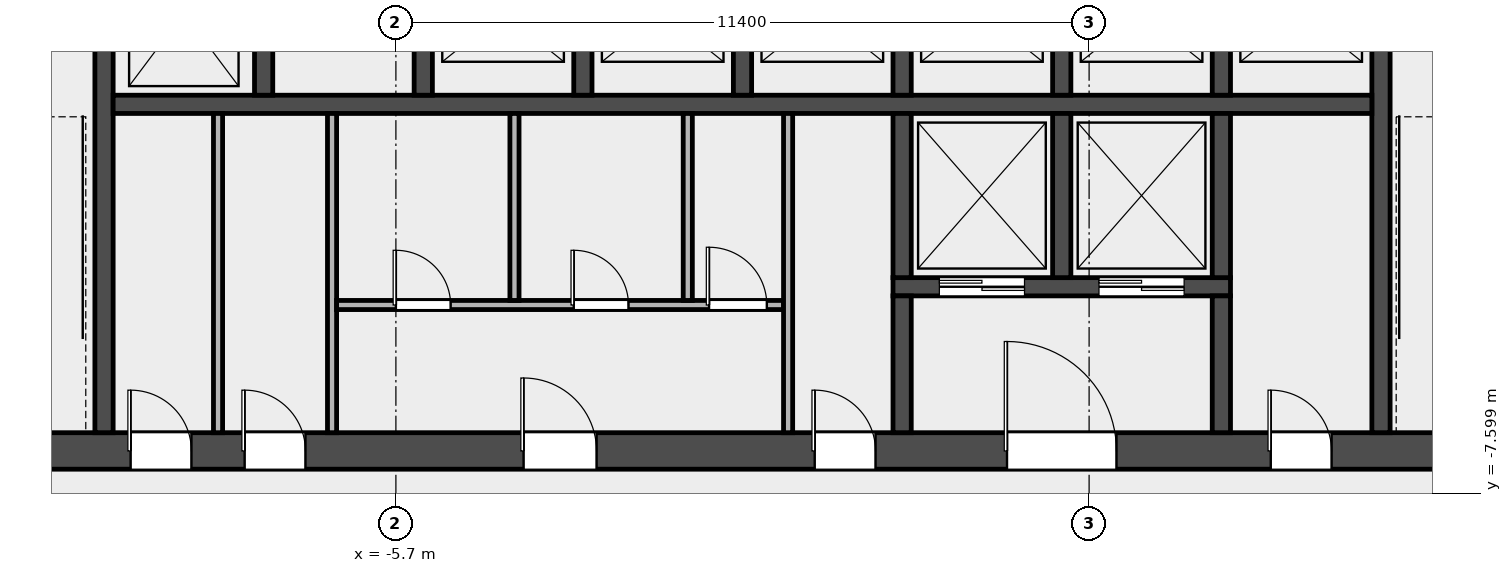
"""IFC4 building model, lengths in metres.
Left out: names, types, materials, properties, quantities, classifications, styles, units other than length and angle.
Written with IfcOpenShell. Run it as: python <this file> out.ifc"""

import sys

from ifc_helpers import new_model, si_unit, direction, frame, frame_2d, origin, place, context, subcontext, project, spatial, rectangle, extrude, element, fill, save


model = new_model("IFC4")
c1 = context("Model", 3, precision=1e-05, world=origin(), true_north=direction((0.0, 1.0)))
c2 = subcontext(c1, "Body", "Model", "MODEL_VIEW")
j1 = project(units=[si_unit("LENGTHUNIT", "METRE"), si_unit("PLANEANGLEUNIT", "RADIAN")], contexts=[c1])
p1 = place(None, origin())
s1 = spatial("IfcSite", under=j1, at=p1, CompositionType="ELEMENT")
p2 = place(p1, origin())
s2 = spatial("IfcBuilding", under=s1, at=p2, CompositionType="ELEMENT")
p3 = place(p2, frame((0.0, 0.0, 40.6)))
s3 = spatial("IfcBuildingStorey", under=s2, at=p3, CompositionType="ELEMENT", Elevation=40.6)
p4 = place(p3, frame((-14.4, -6.9, 0.0), z_axis=(0.0, 0.0, 1.0), x_axis=(1.0, 0.0, 0.0)))
e1 = element("IfcWall", 1, at=p4, inside=s3, PredefinedType="SHEAR", context=c2, shape_type="SweptSolid", body=[
    extrude(rectangle(XDim=28.8, YDim=0.6, at=frame_2d((14.4, 0.0))), origin(), (0.0, 0.0, 1.0), 4.5),
])
p5 = place(p4, frame((4.337, 0.0, 0.0)))
e2 = element("IfcOpeningElement", 2, at=p5, cuts=e1, PredefinedType="OPENING", context=c2, shape_type="SweptSolid", body=[
    extrude(rectangle(XDim=1.0, YDim=2.1, at=frame_2d((0.5, 1.05))), frame((0.0, 0.312, 0.0), z_axis=(0.0, -1.0, 0.0), x_axis=(1.0, 0.0, 0.0)), (0.0, 0.0, 1.0), 0.624),
])
p6 = place(p4, frame((6.212, 0.0, 0.0)))
e3 = element("IfcOpeningElement", 3, at=p6, cuts=e1, PredefinedType="OPENING", context=c2, shape_type="SweptSolid", body=[
    extrude(rectangle(XDim=1.0, YDim=2.1, at=frame_2d((0.5, 1.05))), frame((0.0, 0.312, 0.0), z_axis=(0.0, -1.0, 0.0), x_axis=(1.0, 0.0, 0.0)), (0.0, 0.0, 1.0), 0.624),
])
p7 = place(p4, frame((10.8, 0.0, 0.0)))
e4 = element("IfcOpeningElement", 4, at=p7, cuts=e1, PredefinedType="OPENING", context=c2, shape_type="SweptSolid", body=[
    extrude(rectangle(XDim=1.2, YDim=2.1, at=frame_2d((0.6, 1.05))), frame((0.0, 0.312, 0.0), z_axis=(0.0, -1.0, 0.0), x_axis=(1.0, 0.0, 0.0)), (0.0, 0.0, 1.0), 0.624),
])
p8 = place(p4, frame((15.587, 0.0, 0.0)))
e5 = element("IfcOpeningElement", 5, at=p8, cuts=e1, PredefinedType="OPENING", context=c2, shape_type="SweptSolid", body=[
    extrude(rectangle(XDim=1.0, YDim=2.1, at=frame_2d((0.5, 1.05))), frame((0.0, 0.312, 0.0), z_axis=(0.0, -1.0, 0.0), x_axis=(1.0, 0.0, 0.0)), (0.0, 0.0, 1.0), 0.624),
])
p9 = place(p4, frame((18.75, 0.0, 0.0)))
e6 = element("IfcOpeningElement", 6, at=p9, cuts=e1, PredefinedType="OPENING", context=c2, shape_type="SweptSolid", body=[
    extrude(rectangle(XDim=1.8, YDim=2.1, at=frame_2d((0.9, 1.05))), frame((0.0, 0.312, 0.0), z_axis=(0.0, -1.0, 0.0), x_axis=(1.0, 0.0, 0.0)), (0.0, 0.0, 1.0), 0.624),
])
p10 = place(p4, frame((23.087, 0.0, 0.0)))
e7 = element("IfcOpeningElement", 7, at=p10, cuts=e1, PredefinedType="OPENING", context=c2, shape_type="SweptSolid", body=[
    extrude(rectangle(XDim=1.0, YDim=2.1, at=frame_2d((0.5, 1.05))), frame((0.0, 0.312, 0.0), z_axis=(0.0, -1.0, 0.0), x_axis=(1.0, 0.0, 0.0)), (0.0, 0.0, 1.0), 0.624),
])
for number, where, z_axis, x_axis in (
    (8, (-10.5, -6.6, 0.0), (0.0, 0.0, 1.0), (0.0, 1.0, 0.0)),
    (9, (10.5, -6.6, 0.0), (0.0, 0.0, 1.0), (0.0, 1.0, 0.0)),
):
    element("IfcWall", number, at=place(p3, frame(where, z_axis=z_axis, x_axis=x_axis)), inside=s3, PredefinedType="SHEAR", context=c2, shape_type="SweptSolid", body=[
        extrude(rectangle(XDim=8.55, YDim=0.3, at=frame_2d((4.275, 0.0))), origin(), (0.0, 0.0, 1.0), 4.5),
    ])
p11 = place(p3, frame((-10.35, -1.2, 0.0), z_axis=(0.0, 0.0, 1.0), x_axis=(1.0, 0.0, 0.0)))
e10 = element("IfcWall", 10, at=p11, inside=s3, PredefinedType="SOLIDWALL", context=c2, shape_type="SweptSolid", body=[
    extrude(rectangle(XDim=20.7, YDim=0.3, at=frame_2d((10.35, 0.0))), origin(), (0.0, 0.0, 1.0), 4.5),
])
for number, where, z_axis, x_axis in (
    (11, (-7.875, -1.05, 0.0), (0.0, 0.0, 1.0), (0.0, 1.0, 0.0)),
    (12, (-5.25, -1.05, 0.0), (0.0, 0.0, 1.0), (0.0, 1.0, 0.0)),
    (13, (-2.625, -1.05, 0.0), (0.0, 0.0, 1.0), (0.0, 1.0, 0.0)),
    (14, (0.0, -1.05, 0.0), (0.0, 0.0, 1.0), (0.0, 1.0, 0.0)),
    (15, (2.625, -1.05, 0.0), (0.0, 0.0, 1.0), (0.0, 1.0, 0.0)),
    (16, (5.25, -1.05, 0.0), (0.0, 0.0, 1.0), (0.0, 1.0, 0.0)),
    (17, (7.875, -1.05, 0.0), (0.0, 0.0, 1.0), (0.0, 1.0, 0.0)),
):
    element("IfcWall", number, at=place(p3, frame(where, z_axis=z_axis, x_axis=x_axis)), inside=s3, PredefinedType="SOLIDWALL", context=c2, shape_type="SweptSolid", body=[
        extrude(rectangle(XDim=2.7, YDim=0.3, at=frame_2d((1.35, 0.0))), origin(), (0.0, 0.0, 1.0), 4.5),
    ])
p12 = place(p3, frame((2.475, -4.2, 0.0), z_axis=(0.0, 0.0, 1.0), x_axis=(1.0, 0.0, 0.0)))
e18 = element("IfcWall", 18, at=p12, inside=s3, PredefinedType="SOLIDWALL", context=c2, shape_type="SweptSolid", body=[
    extrude(rectangle(XDim=5.55, YDim=0.3, at=frame_2d((2.775, 0.0))), origin(), (0.0, 0.0, 1.0), 4.5),
])
p13 = place(p12, frame((0.762, 0.0, 0.0)))
e19 = element("IfcOpeningElement", 19, at=p13, cuts=e18, PredefinedType="OPENING", context=c2, shape_type="SweptSolid", body=[
    extrude(rectangle(XDim=1.4, YDim=2.1, at=frame_2d((0.7, 1.05))), frame((0.0, 0.162, 0.0), z_axis=(0.0, -1.0, 0.0), x_axis=(1.0, 0.0, 0.0)), (0.0, 0.0, 1.0), 0.324),
])
p14 = place(p12, frame((3.387, 0.0, 0.0)))
e20 = element("IfcOpeningElement", 20, at=p14, cuts=e18, PredefinedType="OPENING", context=c2, shape_type="SweptSolid", body=[
    extrude(rectangle(XDim=1.4, YDim=2.1, at=frame_2d((0.7, 1.05))), frame((0.0, 0.162, 0.0), z_axis=(0.0, -1.0, 0.0), x_axis=(1.0, 0.0, 0.0)), (0.0, 0.0, 1.0), 0.324),
])
p15 = place(p3, frame((2.625, -4.05, 0.0), z_axis=(0.0, 0.0, 1.0), x_axis=(0.0, 1.0, 0.0)))
e21 = element("IfcWall", 21, at=p15, inside=s3, PredefinedType="SOLIDWALL", context=c2, shape_type="SweptSolid", body=[
    extrude(rectangle(XDim=2.7, YDim=0.3, at=frame_2d((1.35, 0.0))), origin(), (0.0, 0.0, 1.0), 4.5),
])
p16 = place(p3, frame((2.625, -6.6, 0.0), z_axis=(0.0, 0.0, 1.0), x_axis=(0.0, 1.0, 0.0)))
e22 = element("IfcWall", 22, at=p16, inside=s3, PredefinedType="SOLIDWALL", context=c2, shape_type="SweptSolid", body=[
    extrude(rectangle(XDim=2.25, YDim=0.3, at=frame_2d((1.125, 0.0))), origin(), (0.0, 0.0, 1.0), 4.5),
])
for number, where, z_axis, x_axis in (
    (23, (5.25, -4.05, 0.0), (0.0, 0.0, 1.0), (0.0, 1.0, 0.0)),
    (24, (7.875, -4.05, 0.0), (0.0, 0.0, 1.0), (0.0, 1.0, 0.0)),
):
    element("IfcWall", number, at=place(p3, frame(where, z_axis=z_axis, x_axis=x_axis)), inside=s3, PredefinedType="SOLIDWALL", context=c2, shape_type="SweptSolid", body=[
        extrude(rectangle(XDim=2.7, YDim=0.3, at=frame_2d((1.35, 0.0))), origin(), (0.0, 0.0, 1.0), 4.5),
    ])
p17 = place(p3, frame((7.875, -6.6, 0.0), z_axis=(0.0, 0.0, 1.0), x_axis=(0.0, 1.0, 0.0)))
e25 = element("IfcWall", 25, at=p17, inside=s3, PredefinedType="SOLIDWALL", context=c2, shape_type="SweptSolid", body=[
    extrude(rectangle(XDim=2.25, YDim=0.3, at=frame_2d((1.125, 0.0))), origin(), (0.0, 0.0, 1.0), 4.5),
])
for number, where, z_axis, x_axis in (
    (26, (-8.625, -6.6, 0.0), (0.0, 0.0, 1.0), (0.0, 1.0, 0.0)),
    (27, (-6.75, -6.6, 0.0), (0.0, 0.0, 1.0), (0.0, 1.0, 0.0)),
):
    element("IfcWall", number, at=place(p3, frame(where, z_axis=z_axis, x_axis=x_axis)), inside=s3, PredefinedType="PARTITIONING", context=c2, shape_type="SweptSolid", body=[
        extrude(rectangle(XDim=5.25, YDim=0.15, at=frame_2d((2.625, 0.0))), origin(), (0.0, 0.0, 1.0), 4.5),
    ])
p18 = place(p3, frame((-6.675, -4.5, 0.0), z_axis=(0.0, 0.0, 1.0), x_axis=(1.0, 0.0, 0.0)))
e28 = element("IfcWall", 28, at=p18, inside=s3, PredefinedType="PARTITIONING", context=c2, shape_type="SweptSolid", body=[
    extrude(rectangle(XDim=7.35, YDim=0.15, at=frame_2d((3.675, 0.0))), origin(), (0.0, 0.0, 1.0), 4.5),
])
p19 = place(p18, frame((0.975, 0.0, 0.0)))
e29 = element("IfcOpeningElement", 29, at=p19, cuts=e28, PredefinedType="OPENING", context=c2, shape_type="SweptSolid", body=[
    extrude(rectangle(XDim=0.9, YDim=2.1, at=frame_2d((0.45, 1.05))), frame((0.0, 0.087, 0.0), z_axis=(0.0, -1.0, 0.0), x_axis=(1.0, 0.0, 0.0)), (0.0, 0.0, 1.0), 0.174),
])
p20 = place(p18, frame((3.9, 0.0, 0.0)))
e30 = element("IfcOpeningElement", 30, at=p20, cuts=e28, PredefinedType="OPENING", context=c2, shape_type="SweptSolid", body=[
    extrude(rectangle(XDim=0.9, YDim=2.1, at=frame_2d((0.45, 1.05))), frame((0.0, 0.087, 0.0), z_axis=(0.0, -1.0, 0.0), x_axis=(1.0, 0.0, 0.0)), (0.0, 0.0, 1.0), 0.174),
])
p21 = place(p18, frame((6.125, 0.0, 0.0)))
e31 = element("IfcOpeningElement", 31, at=p21, cuts=e28, PredefinedType="OPENING", context=c2, shape_type="SweptSolid", body=[
    extrude(rectangle(XDim=0.95, YDim=2.1, at=frame_2d((0.475, 1.05))), frame((0.0, 0.087, 0.0), z_axis=(0.0, -1.0, 0.0), x_axis=(1.0, 0.0, 0.0)), (0.0, 0.0, 1.0), 0.174),
])
for number, where, z_axis, x_axis in (
    (32, (-3.75, -4.425, 0.0), (0.0, 0.0, 1.0), (0.0, 1.0, 0.0)),
    (33, (-0.9, -4.425, 0.0), (0.0, 0.0, 1.0), (0.0, 1.0, 0.0)),
):
    element("IfcWall", number, at=place(p3, frame(where, z_axis=z_axis, x_axis=x_axis)), inside=s3, PredefinedType="PARTITIONING", context=c2, shape_type="SweptSolid", body=[
        extrude(rectangle(XDim=3.075, YDim=0.15, at=frame_2d((1.538, 0.0))), origin(), (0.0, 0.0, 1.0), 4.5),
    ])
p22 = place(p3, frame((0.75, -6.6, 0.0), z_axis=(0.0, 0.0, 1.0), x_axis=(0.0, 1.0, 0.0)))
e34 = element("IfcWall", 34, at=p22, inside=s3, PredefinedType="PARTITIONING", context=c2, shape_type="SweptSolid", body=[
    extrude(rectangle(XDim=5.25, YDim=0.15, at=frame_2d((2.625, 0.0))), origin(), (0.0, 0.0, 1.0), 4.5),
])
p23 = place(p13, origin())
e35 = element("IfcDoor", 35, at=p23, inside=s3, OperationType="DOUBLE_DOOR_SLIDING", PredefinedType="DOOR", context=c2, shape_type="SweptSolid", body=[
    extrude(rectangle(XDim=1.4, YDim=2.1, at=frame_2d((0.7, 1.05))), frame((0.0, 0.025, 0.0), z_axis=(0.0, -1.0, 0.0), x_axis=(1.0, 0.0, 0.0)), (0.0, 0.0, 1.0), 0.05),
])
fill(e19, e35)
p24 = place(p14, origin())
e36 = element("IfcDoor", 36, at=p24, inside=s3, OperationType="DOUBLE_DOOR_SLIDING", PredefinedType="DOOR", context=c2, shape_type="SweptSolid", body=[
    extrude(rectangle(XDim=1.4, YDim=2.1, at=frame_2d((0.7, 1.05))), frame((0.0, 0.025, 0.0), z_axis=(0.0, -1.0, 0.0), x_axis=(1.0, 0.0, 0.0)), (0.0, 0.0, 1.0), 0.05),
])
fill(e20, e36)
p25 = place(p5, origin())
e37 = element("IfcDoor", 37, at=p25, inside=s3, OperationType="SINGLE_SWING_LEFT", PredefinedType="DOOR", context=c2, shape_type="SweptSolid", body=[
    extrude(rectangle(XDim=1.0, YDim=2.1, at=frame_2d((0.5, 1.05))), frame((0.0, 0.025, 0.0), z_axis=(0.0, -1.0, 0.0), x_axis=(1.0, 0.0, 0.0)), (0.0, 0.0, 1.0), 0.05),
])
fill(e2, e37)
p26 = place(p6, origin())
e38 = element("IfcDoor", 38, at=p26, inside=s3, OperationType="SINGLE_SWING_LEFT", PredefinedType="DOOR", context=c2, shape_type="SweptSolid", body=[
    extrude(rectangle(XDim=1.0, YDim=2.1, at=frame_2d((0.5, 1.05))), frame((0.0, 0.025, 0.0), z_axis=(0.0, -1.0, 0.0), x_axis=(1.0, 0.0, 0.0)), (0.0, 0.0, 1.0), 0.05),
])
fill(e3, e38)
p27 = place(p7, origin())
e39 = element("IfcDoor", 39, at=p27, inside=s3, OperationType="SINGLE_SWING_LEFT", PredefinedType="DOOR", context=c2, shape_type="SweptSolid", body=[
    extrude(rectangle(XDim=1.2, YDim=2.1, at=frame_2d((0.6, 1.05))), frame((0.0, 0.025, 0.0), z_axis=(0.0, -1.0, 0.0), x_axis=(1.0, 0.0, 0.0)), (0.0, 0.0, 1.0), 0.05),
])
fill(e4, e39)
p28 = place(p19, origin())
e40 = element("IfcDoor", 40, at=p28, inside=s3, OperationType="SINGLE_SWING_LEFT", PredefinedType="DOOR", context=c2, shape_type="SweptSolid", body=[
    extrude(rectangle(XDim=0.9, YDim=2.1, at=frame_2d((0.45, 1.05))), frame((0.0, 0.025, 0.0), z_axis=(0.0, -1.0, 0.0), x_axis=(1.0, 0.0, 0.0)), (0.0, 0.0, 1.0), 0.05),
])
fill(e29, e40)
p29 = place(p20, origin())
e41 = element("IfcDoor", 41, at=p29, inside=s3, OperationType="SINGLE_SWING_LEFT", PredefinedType="DOOR", context=c2, shape_type="SweptSolid", body=[
    extrude(rectangle(XDim=0.9, YDim=2.1, at=frame_2d((0.45, 1.05))), frame((0.0, 0.025, 0.0), z_axis=(0.0, -1.0, 0.0), x_axis=(1.0, 0.0, 0.0)), (0.0, 0.0, 1.0), 0.05),
])
fill(e30, e41)
p30 = place(p21, origin())
e42 = element("IfcDoor", 42, at=p30, inside=s3, OperationType="SINGLE_SWING_LEFT", PredefinedType="DOOR", context=c2, shape_type="SweptSolid", body=[
    extrude(rectangle(XDim=0.95, YDim=2.1, at=frame_2d((0.475, 1.05))), frame((0.0, 0.025, 0.0), z_axis=(0.0, -1.0, 0.0), x_axis=(1.0, 0.0, 0.0)), (0.0, 0.0, 1.0), 0.05),
])
fill(e31, e42)
p31 = place(p8, origin())
e43 = element("IfcDoor", 43, at=p31, inside=s3, OperationType="SINGLE_SWING_LEFT", PredefinedType="DOOR", context=c2, shape_type="SweptSolid", body=[
    extrude(rectangle(XDim=1.0, YDim=2.1, at=frame_2d((0.5, 1.05))), frame((0.0, 0.025, 0.0), z_axis=(0.0, -1.0, 0.0), x_axis=(1.0, 0.0, 0.0)), (0.0, 0.0, 1.0), 0.05),
])
fill(e5, e43)
p32 = place(p9, origin())
e44 = element("IfcDoor", 44, at=p32, inside=s3, OperationType="DOUBLE_DOOR_SINGLE_SWING", PredefinedType="DOOR", context=c2, shape_type="SweptSolid", body=[
    extrude(rectangle(XDim=1.8, YDim=2.1, at=frame_2d((0.9, 1.05))), frame((0.0, 0.025, 0.0), z_axis=(0.0, -1.0, 0.0), x_axis=(1.0, 0.0, 0.0)), (0.0, 0.0, 1.0), 0.05),
])
fill(e6, e44)
p33 = place(p10, origin())
e45 = element("IfcDoor", 45, at=p33, inside=s3, OperationType="SINGLE_SWING_LEFT", PredefinedType="DOOR", context=c2, shape_type="SweptSolid", body=[
    extrude(rectangle(XDim=1.0, YDim=2.1, at=frame_2d((0.5, 1.05))), frame((0.0, 0.025, 0.0), z_axis=(0.0, -1.0, 0.0), x_axis=(1.0, 0.0, 0.0)), (0.0, 0.0, 1.0), 0.05),
])
fill(e7, e45)
save(model, sys.argv[1])
